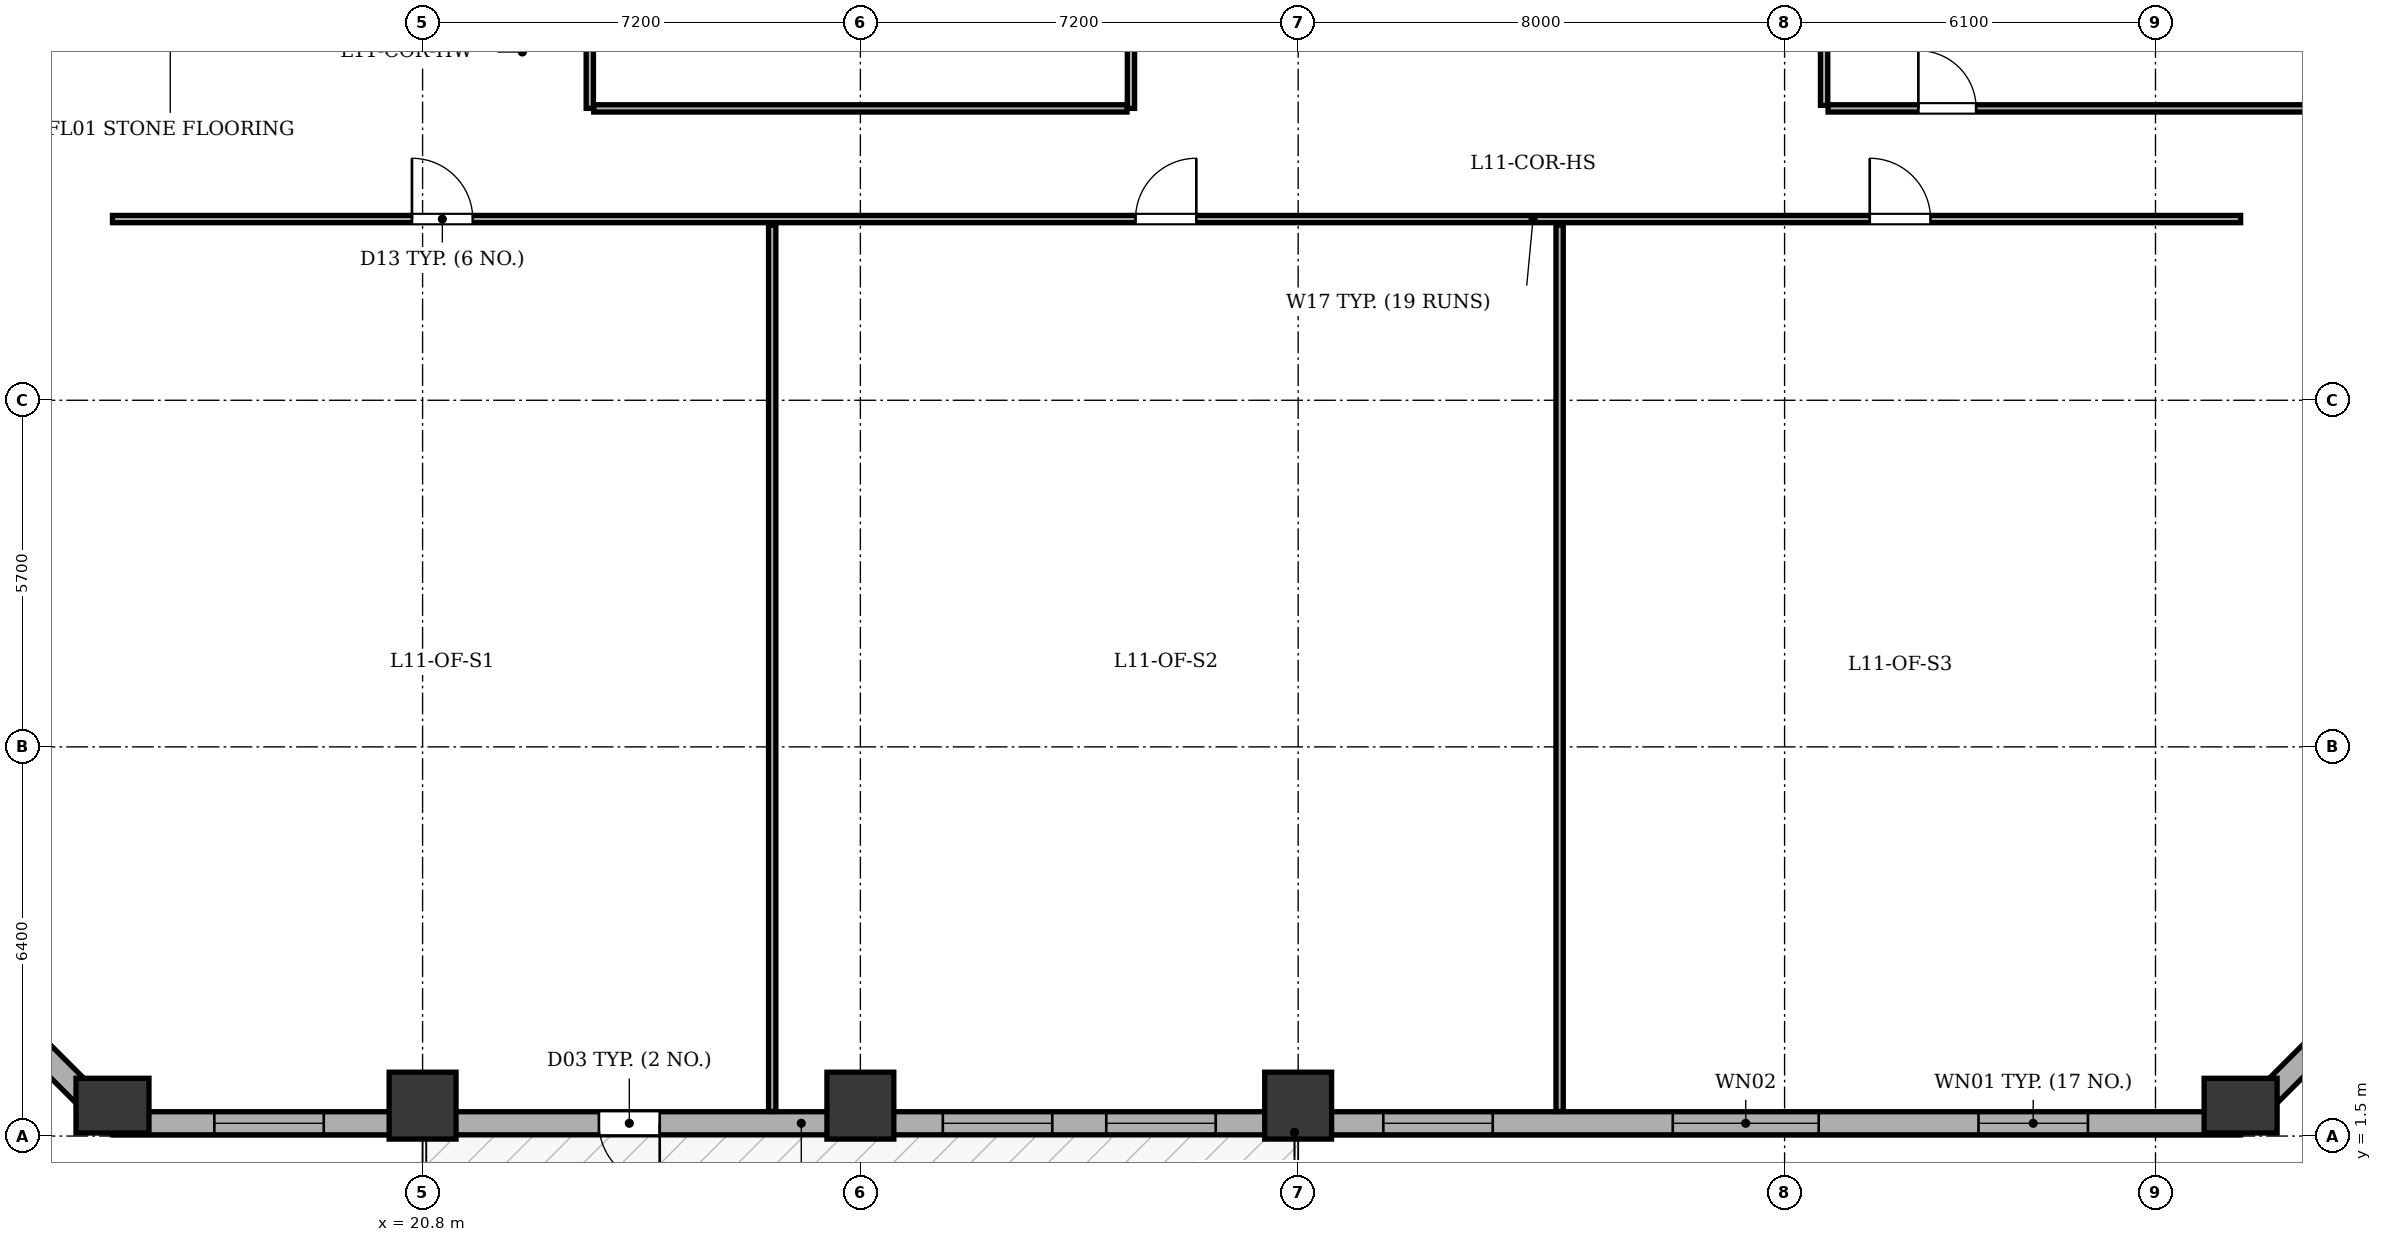
"""IFC4 building model, lengths in metres.
Left out: names, types, materials, properties, quantities, classifications, styles, units other than length and angle.
Written with IfcOpenShell. Run it as: python <this file> out.ifc"""

import sys

from ifc_helpers import new_model, si_unit, direction, frame, frame_2d, origin, origin_2d, place, context, subcontext, project, spatial, rectangle, extrude, element, fill, save


model = new_model("IFC4")
c1 = context("Model", 3, precision=1e-05, world=origin(), true_north=direction((0.0, 1.0)))
c2 = subcontext(c1, "Body", "Model", "MODEL_VIEW")
j1 = project(units=[si_unit("LENGTHUNIT", "METRE"), si_unit("PLANEANGLEUNIT", "RADIAN")], contexts=[c1])
p1 = place(None, origin())
s1 = spatial("IfcSite", under=j1, at=p1, CompositionType="ELEMENT")
p2 = place(p1, origin())
s2 = spatial("IfcBuilding", under=s1, at=p2, CompositionType="ELEMENT")
p3 = place(p2, frame((0.0, 0.0, 47.7)))
s3 = spatial("IfcBuildingStorey", under=s2, at=p3, CompositionType="ELEMENT", Elevation=47.7)
p4 = place(p3, frame((15.7, 2.0, 0.0), z_axis=(0.0, 0.0, 1.0), x_axis=(1.0, 0.0, 0.0)))
e1 = element("IfcColumn", 1, at=p4, inside=s3, PredefinedType="COLUMN", context=c2, shape_type="SweptSolid", body=[
    extrude(rectangle(XDim=0.9, YDim=1.2, at=origin_2d()), origin(), (0.0, 0.0, 1.0), 3.9),
])
for number, where, z_axis, x_axis in (
    (2, (20.8, 2.0, 0.0), (0.0, 0.0, 1.0), (1.0, 0.0, 0.0)),
    (3, (28.0, 2.0, 0.0), (0.0, 0.0, 1.0), (1.0, 0.0, 0.0)),
    (4, (35.2, 2.0, 0.0), (0.0, 0.0, 1.0), (1.0, 0.0, 0.0)),
):
    element("IfcColumn", number, at=place(p3, frame(where, z_axis=z_axis, x_axis=x_axis)), inside=s3, PredefinedType="COLUMN", context=c2, shape_type="SweptSolid", body=[
        extrude(rectangle(XDim=1.1, YDim=1.1, at=origin_2d()), origin(), (0.0, 0.0, 1.0), 3.9),
    ])
p5 = place(p3, frame((50.7, 2.0, 0.0), z_axis=(0.0, 0.0, 1.0), x_axis=(1.0, 0.0, 0.0)))
e5 = element("IfcColumn", 5, at=p5, inside=s3, PredefinedType="COLUMN", context=c2, shape_type="SweptSolid", body=[
    extrude(rectangle(XDim=0.9, YDim=1.2, at=origin_2d()), origin(), (0.0, 0.0, 1.0), 3.9),
])
p6 = place(p3, frame((50.7, 1.71, 0.0), z_axis=(0.0, 0.0, 1.0), x_axis=(-1.0, 0.0, 0.0)))
e6 = element("IfcWall", 6, at=p6, inside=s3, PredefinedType="STANDARD", context=c2, shape_type="SweptSolid", body=[
    extrude(rectangle(XDim=35.0, YDim=0.38, at=frame_2d((17.5, 0.0))), origin(), (0.0, 0.0, 1.0), 3.135),
])
p7 = place(p6, frame((26.0, 0.0, 0.0)))
e7 = element("IfcOpeningElement", 7, at=p7, cuts=e6, PredefinedType="OPENING", context=c2, shape_type="SweptSolid", body=[
    extrude(rectangle(XDim=1.0, YDim=2.02, at=frame_2d((0.5, 1.01))), frame((0.0, 0.2, 0.0), z_axis=(0.0, -1.0, 0.0), x_axis=(1.0, 0.0, 0.0)), (0.0, 0.0, 1.0), 0.4),
])
p8 = place(p6, frame((2.511, 0.0, 0.8)))
e8 = element("IfcOpeningElement", 8, at=p8, cuts=e6, PredefinedType="OPENING", context=c2, shape_type="SweptSolid", body=[
    extrude(rectangle(XDim=1.8, YDim=1.9, at=frame_2d((0.9, 0.95))), frame((0.0, 0.2, 0.0), z_axis=(0.0, -1.0, 0.0), x_axis=(1.0, 0.0, 0.0)), (0.0, 0.0, 1.0), 0.4),
])
p9 = place(p6, frame((6.939, 0.0, 0.8)))
e9 = element("IfcOpeningElement", 9, at=p9, cuts=e6, PredefinedType="OPENING", context=c2, shape_type="SweptSolid", body=[
    extrude(rectangle(XDim=2.4, YDim=1.9, at=frame_2d((1.2, 0.95))), frame((0.0, 0.2, 0.0), z_axis=(0.0, -1.0, 0.0), x_axis=(1.0, 0.0, 0.0)), (0.0, 0.0, 1.0), 0.4),
])
p10 = place(p6, frame((12.3, 0.0, 0.8)))
e10 = element("IfcOpeningElement", 10, at=p10, cuts=e6, PredefinedType="OPENING", context=c2, shape_type="SweptSolid", body=[
    extrude(rectangle(XDim=1.8, YDim=1.9, at=frame_2d((0.9, 0.95))), frame((0.0, 0.2, 0.0), z_axis=(0.0, -1.0, 0.0), x_axis=(1.0, 0.0, 0.0)), (0.0, 0.0, 1.0), 0.4),
])
p11 = place(p6, frame((16.856, 0.0, 0.8)))
e11 = element("IfcOpeningElement", 11, at=p11, cuts=e6, PredefinedType="OPENING", context=c2, shape_type="SweptSolid", body=[
    extrude(rectangle(XDim=1.8, YDim=1.9, at=frame_2d((0.9, 0.95))), frame((0.0, 0.2, 0.0), z_axis=(0.0, -1.0, 0.0), x_axis=(1.0, 0.0, 0.0)), (0.0, 0.0, 1.0), 0.4),
])
p12 = place(p6, frame((19.544, 0.0, 0.8)))
e12 = element("IfcOpeningElement", 12, at=p12, cuts=e6, PredefinedType="OPENING", context=c2, shape_type="SweptSolid", body=[
    extrude(rectangle(XDim=1.8, YDim=1.9, at=frame_2d((0.9, 0.95))), frame((0.0, 0.2, 0.0), z_axis=(0.0, -1.0, 0.0), x_axis=(1.0, 0.0, 0.0)), (0.0, 0.0, 1.0), 0.4),
])
p13 = place(p6, frame((31.525, 0.0, 0.8)))
e13 = element("IfcOpeningElement", 13, at=p13, cuts=e6, PredefinedType="OPENING", context=c2, shape_type="SweptSolid", body=[
    extrude(rectangle(XDim=1.8, YDim=1.9, at=frame_2d((0.9, 0.95))), frame((0.0, 0.2, 0.0), z_axis=(0.0, -1.0, 0.0), x_axis=(1.0, 0.0, 0.0)), (0.0, 0.0, 1.0), 0.4),
])
p14 = place(p3, frame((15.7, 1.71, 0.0), z_axis=(0.0, 0.0, 1.0), x_axis=(-0.707106781187, 0.707106781187, 0.0)))
e14 = element("IfcWall", 14, at=p14, inside=s3, PredefinedType="STANDARD", context=c2, shape_type="SweptSolid", body=[
    extrude(rectangle(XDim=6.774, YDim=0.38, at=frame_2d((3.387, 0.0))), origin(), (0.0, 0.0, 1.0), 3.135),
])
p15 = place(p14, frame((2.687, 0.0, 0.8)))
e15 = element("IfcOpeningElement", 15, at=p15, cuts=e14, PredefinedType="OPENING", context=c2, shape_type="SweptSolid", body=[
    extrude(rectangle(XDim=1.4, YDim=1.65, at=frame_2d((0.7, 0.825))), frame((0.0, 0.2, 0.0), z_axis=(0.0, -1.0, 0.0), x_axis=(1.0, 0.0, 0.0)), (0.0, 0.0, 1.0), 0.4),
])
p16 = place(p3, frame((55.49, 6.5, 0.0), z_axis=(0.0, 0.0, 1.0), x_axis=(-0.707106781187, -0.707106781187, 0.0)))
e16 = element("IfcWall", 16, at=p16, inside=s3, PredefinedType="STANDARD", context=c2, shape_type="SweptSolid", body=[
    extrude(rectangle(XDim=6.774, YDim=0.38, at=frame_2d((3.387, 0.0))), origin(), (0.0, 0.0, 1.0), 3.135),
])
p17 = place(p16, frame((2.687, 0.0, 0.8)))
e17 = element("IfcOpeningElement", 17, at=p17, cuts=e16, PredefinedType="OPENING", context=c2, shape_type="SweptSolid", body=[
    extrude(rectangle(XDim=1.4, YDim=1.65, at=frame_2d((0.7, 0.825))), frame((0.0, 0.2, 0.0), z_axis=(0.0, -1.0, 0.0), x_axis=(1.0, 0.0, 0.0)), (0.0, 0.0, 1.0), 0.4),
])
for number, where, z_axis, x_axis in (
    (18, (23.55, 18.4, 0.0), (0.0, 0.0, 1.0), (0.0, 1.0, 0.0)),
    (19, (32.45, 18.4, 0.0), (0.0, 0.0, 1.0), (0.0, 1.0, 0.0)),
):
    element("IfcWall", number, at=place(p3, frame(where, z_axis=z_axis, x_axis=x_axis)), inside=s3, PredefinedType="PARTITIONING", context=c2, shape_type="SweptSolid", body=[
        extrude(rectangle(XDim=3.485, YDim=0.12, at=frame_2d((1.743, 0.0))), origin(), (0.0, 0.0, 1.0), 3.6),
    ])
p18 = place(p3, frame((23.615, 18.4, 0.0), z_axis=(0.0, 0.0, 1.0), x_axis=(1.0, 0.0, 0.0)))
e20 = element("IfcWall", 20, at=p18, inside=s3, PredefinedType="PARTITIONING", context=c2, shape_type="SweptSolid", body=[
    extrude(rectangle(XDim=8.77, YDim=0.12, at=frame_2d((4.385, 0.0))), origin(), (0.0, 0.0, 1.0), 3.6),
])
p19 = place(p3, frame((15.7, 16.58, 0.0), z_axis=(0.0, 0.0, 1.0), x_axis=(1.0, 0.0, 0.0)))
e21 = element("IfcWall", 21, at=p19, inside=s3, PredefinedType="PARTITIONING", context=c2, shape_type="SweptSolid", body=[
    extrude(rectangle(XDim=35.0, YDim=0.12, at=frame_2d((17.5, 0.0))), origin(), (0.0, 0.0, 1.0), 3.6),
])
p20 = place(p19, frame((4.925, 0.0, 0.0)))
e22 = element("IfcOpeningElement", 22, at=p20, cuts=e21, PredefinedType="OPENING", context=c2, shape_type="SweptSolid", body=[
    extrude(rectangle(XDim=1.0, YDim=2.1, at=frame_2d((0.5, 1.05))), frame((0.0, 0.07, 0.0), z_axis=(0.0, -1.0, 0.0), x_axis=(1.0, 0.0, 0.0)), (0.0, 0.0, 1.0), 0.14),
])
p21 = place(p19, frame((16.825, 0.0, 0.0)))
e23 = element("IfcOpeningElement", 23, at=p21, cuts=e21, PredefinedType="OPENING", context=c2, shape_type="SweptSolid", body=[
    extrude(rectangle(XDim=1.0, YDim=2.1, at=frame_2d((0.5, 1.05))), frame((0.0, 0.07, 0.0), z_axis=(0.0, -1.0, 0.0), x_axis=(1.0, 0.0, 0.0)), (0.0, 0.0, 1.0), 0.14),
])
p22 = place(p19, frame((28.9, 0.0, 0.0)))
e24 = element("IfcOpeningElement", 24, at=p22, cuts=e21, PredefinedType="OPENING", context=c2, shape_type="SweptSolid", body=[
    extrude(rectangle(XDim=1.0, YDim=2.1, at=frame_2d((0.5, 1.05))), frame((0.0, 0.07, 0.0), z_axis=(0.0, -1.0, 0.0), x_axis=(1.0, 0.0, 0.0)), (0.0, 0.0, 1.0), 0.14),
])
for number, where, z_axis, x_axis in (
    (25, (26.55, 1.905, 0.0), (0.0, 0.0, 1.0), (0.0, 1.0, 0.0)),
    (26, (39.5, 1.905, 0.0), (0.0, 0.0, 1.0), (0.0, 1.0, 0.0)),
):
    element("IfcWall", number, at=place(p3, frame(where, z_axis=z_axis, x_axis=x_axis)), inside=s3, PredefinedType="PARTITIONING", context=c2, shape_type="SweptSolid", body=[
        extrude(rectangle(XDim=14.575, YDim=0.12, at=frame_2d((7.288, 0.0))), origin(), (0.0, 0.0, 1.0), 3.6),
    ])
p23 = place(p3, frame((43.85, 18.45, 0.0), z_axis=(0.0, 0.0, 1.0), x_axis=(0.0, 1.0, 0.0)))
e27 = element("IfcWall", 27, at=p23, inside=s3, PredefinedType="PARTITIONING", context=c2, shape_type="SweptSolid", body=[
    extrude(rectangle(XDim=17.5, YDim=0.12, at=frame_2d((8.75, 0.0))), origin(), (0.0, 0.0, 1.0), 3.6),
])
p24 = place(p3, frame((43.915, 18.4, 0.0), z_axis=(0.0, 0.0, 1.0), x_axis=(1.0, 0.0, 0.0)))
e28 = element("IfcWall", 28, at=p24, inside=s3, PredefinedType="PARTITIONING", context=c2, shape_type="SweptSolid", body=[
    extrude(rectangle(XDim=11.38, YDim=0.12, at=frame_2d((5.69, 0.0))), origin(), (0.0, 0.0, 1.0), 3.6),
])
p25 = place(p24, frame((1.485, 0.0, 0.0)))
e29 = element("IfcOpeningElement", 29, at=p25, cuts=e28, PredefinedType="OPENING", context=c2, shape_type="SweptSolid", body=[
    extrude(rectangle(XDim=0.95, YDim=2.1, at=frame_2d((0.475, 1.05))), frame((0.0, 0.07, 0.0), z_axis=(0.0, -1.0, 0.0), x_axis=(1.0, 0.0, 0.0)), (0.0, 0.0, 1.0), 0.14),
])
p26 = place(p7, origin())
e30 = element("IfcDoor", 30, at=p26, inside=s3, OperationType="SINGLE_SWING_LEFT", PredefinedType="DOOR", context=c2, shape_type="SweptSolid", body=[
    extrude(rectangle(XDim=1.0, YDim=2.02, at=frame_2d((0.5, 1.01))), frame((0.0, 0.025, 0.0), z_axis=(0.0, -1.0, 0.0), x_axis=(1.0, 0.0, 0.0)), (0.0, 0.0, 1.0), 0.05),
])
fill(e7, e30)
p27 = place(p8, origin())
e31 = element("IfcWindow", 31, at=p27, inside=s3, PartitioningType="SINGLE_PANEL", PredefinedType="WINDOW", context=c2, shape_type="SweptSolid", body=[
    extrude(rectangle(XDim=1.8, YDim=1.9, at=frame_2d((0.9, 0.95))), frame((0.0, -0.01, 0.0), z_axis=(0.0, -1.0, 0.0), x_axis=(1.0, 0.0, 0.0)), (0.0, 0.0, 1.0), 0.06),
])
fill(e8, e31)
p28 = place(p9, origin())
e32 = element("IfcWindow", 32, at=p28, inside=s3, PartitioningType="SINGLE_PANEL", PredefinedType="WINDOW", context=c2, shape_type="SweptSolid", body=[
    extrude(rectangle(XDim=2.4, YDim=1.9, at=frame_2d((1.2, 0.95))), frame((0.0, -0.01, 0.0), z_axis=(0.0, -1.0, 0.0), x_axis=(1.0, 0.0, 0.0)), (0.0, 0.0, 1.0), 0.06),
])
fill(e9, e32)
p29 = place(p10, origin())
e33 = element("IfcWindow", 33, at=p29, inside=s3, PartitioningType="SINGLE_PANEL", PredefinedType="WINDOW", context=c2, shape_type="SweptSolid", body=[
    extrude(rectangle(XDim=1.8, YDim=1.9, at=frame_2d((0.9, 0.95))), frame((0.0, -0.01, 0.0), z_axis=(0.0, -1.0, 0.0), x_axis=(1.0, 0.0, 0.0)), (0.0, 0.0, 1.0), 0.06),
])
fill(e10, e33)
p30 = place(p11, origin())
e34 = element("IfcWindow", 34, at=p30, inside=s3, PartitioningType="SINGLE_PANEL", PredefinedType="WINDOW", context=c2, shape_type="SweptSolid", body=[
    extrude(rectangle(XDim=1.8, YDim=1.9, at=frame_2d((0.9, 0.95))), frame((0.0, -0.01, 0.0), z_axis=(0.0, -1.0, 0.0), x_axis=(1.0, 0.0, 0.0)), (0.0, 0.0, 1.0), 0.06),
])
fill(e11, e34)
p31 = place(p12, origin())
e35 = element("IfcWindow", 35, at=p31, inside=s3, PartitioningType="SINGLE_PANEL", PredefinedType="WINDOW", context=c2, shape_type="SweptSolid", body=[
    extrude(rectangle(XDim=1.8, YDim=1.9, at=frame_2d((0.9, 0.95))), frame((0.0, -0.01, 0.0), z_axis=(0.0, -1.0, 0.0), x_axis=(1.0, 0.0, 0.0)), (0.0, 0.0, 1.0), 0.06),
])
fill(e12, e35)
p32 = place(p13, origin())
e36 = element("IfcWindow", 36, at=p32, inside=s3, PartitioningType="SINGLE_PANEL", PredefinedType="WINDOW", context=c2, shape_type="SweptSolid", body=[
    extrude(rectangle(XDim=1.8, YDim=1.9, at=frame_2d((0.9, 0.95))), frame((0.0, -0.01, 0.0), z_axis=(0.0, -1.0, 0.0), x_axis=(1.0, 0.0, 0.0)), (0.0, 0.0, 1.0), 0.06),
])
fill(e13, e36)
p33 = place(p20, origin())
e37 = element("IfcDoor", 37, at=p33, inside=s3, OperationType="SINGLE_SWING_LEFT", PredefinedType="DOOR", context=c2, shape_type="SweptSolid", body=[
    extrude(rectangle(XDim=1.0, YDim=2.1, at=frame_2d((0.5, 1.05))), frame((0.0, 0.025, 0.0), z_axis=(0.0, -1.0, 0.0), x_axis=(1.0, 0.0, 0.0)), (0.0, 0.0, 1.0), 0.05),
])
fill(e22, e37)
p34 = place(p21, origin())
e38 = element("IfcDoor", 38, at=p34, inside=s3, OperationType="SINGLE_SWING_RIGHT", PredefinedType="DOOR", context=c2, shape_type="SweptSolid", body=[
    extrude(rectangle(XDim=1.0, YDim=2.1, at=frame_2d((0.5, 1.05))), frame((0.0, 0.025, 0.0), z_axis=(0.0, -1.0, 0.0), x_axis=(1.0, 0.0, 0.0)), (0.0, 0.0, 1.0), 0.05),
])
fill(e23, e38)
p35 = place(p22, origin())
e39 = element("IfcDoor", 39, at=p35, inside=s3, OperationType="SINGLE_SWING_LEFT", PredefinedType="DOOR", context=c2, shape_type="SweptSolid", body=[
    extrude(rectangle(XDim=1.0, YDim=2.1, at=frame_2d((0.5, 1.05))), frame((0.0, 0.025, 0.0), z_axis=(0.0, -1.0, 0.0), x_axis=(1.0, 0.0, 0.0)), (0.0, 0.0, 1.0), 0.05),
])
fill(e24, e39)
p36 = place(p25, origin())
e40 = element("IfcDoor", 40, at=p36, inside=s3, OperationType="SINGLE_SWING_LEFT", PredefinedType="DOOR", context=c2, shape_type="SweptSolid", body=[
    extrude(rectangle(XDim=0.95, YDim=2.1, at=frame_2d((0.475, 1.05))), frame((0.0, 0.025, 0.0), z_axis=(0.0, -1.0, 0.0), x_axis=(1.0, 0.0, 0.0)), (0.0, 0.0, 1.0), 0.05),
])
fill(e29, e40)
save(model, sys.argv[1])
